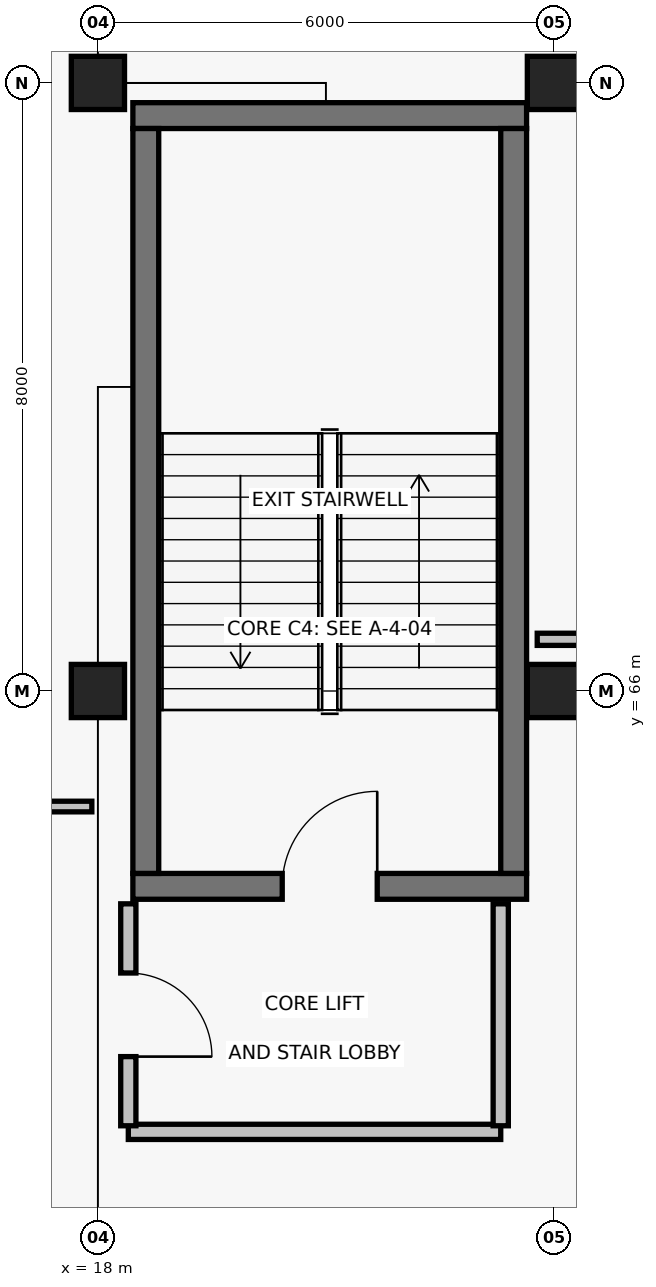
"""IFC4 building model, lengths in metres.
Left out: names, types, materials, properties, quantities, classifications, styles, units other than length and angle.
Written with IfcOpenShell. Run it as: python <this file> out.ifc"""

import sys

from ifc_helpers import new_model, si_unit, direction, frame, frame_2d, origin, origin_2d, place, context, subcontext, project, spatial, rectangle, extrude, element, fill, save


model = new_model("IFC4")
c1 = context("Model", 3, precision=1e-05, world=origin(), true_north=direction((0.0, 1.0)))
c2 = subcontext(c1, "Body", "Model", "MODEL_VIEW")
j1 = project(units=[si_unit("LENGTHUNIT", "METRE"), si_unit("PLANEANGLEUNIT", "RADIAN")], contexts=[c1])
p1 = place(None, origin())
s1 = spatial("IfcSite", under=j1, at=p1, CompositionType="ELEMENT")
p2 = place(p1, origin())
s2 = spatial("IfcBuilding", under=s1, at=p2, CompositionType="ELEMENT")
p3 = place(p2, frame((0.0, 0.0, 6.6)))
s3 = spatial("IfcBuildingStorey", under=s2, at=p3, CompositionType="ELEMENT", Elevation=6.6)
for number, where, z_axis, x_axis in (
    (1, (18.0, 66.0, 0.0), (0.0, 0.0, 1.0), (1.0, 0.0, 0.0)),
    (2, (18.0, 74.0, 0.0), (0.0, 0.0, 1.0), (1.0, 0.0, 0.0)),
    (3, (24.0, 66.0, 0.0), (0.0, 0.0, 1.0), (1.0, 0.0, 0.0)),
    (4, (24.0, 74.0, 0.0), (0.0, 0.0, 1.0), (1.0, 0.0, 0.0)),
):
    element("IfcColumn", number, at=place(p3, frame(where, z_axis=z_axis, x_axis=x_axis)), inside=s3, PredefinedType="COLUMN", context=c2, shape_type="SweptSolid", body=[
        extrude(rectangle(XDim=0.7, YDim=0.7, at=origin_2d()), origin(), (0.0, 0.0, 1.0), 4.8),
    ])
p4 = place(p3, frame((18.46, 63.43, 0.0), z_axis=(0.0, 0.0, 1.0), x_axis=(1.0, 0.0, 0.0)))
e5 = element("IfcWall", 5, at=p4, inside=s3, PredefinedType="SHEAR", context=c2, shape_type="SweptSolid", body=[
    extrude(rectangle(XDim=5.18, YDim=0.34, at=frame_2d((2.59, 0.0))), origin(), (0.0, 0.0, 1.0), 4.54),
])
p5 = place(p4, frame((1.965, 0.0, 0.0)))
e6 = element("IfcOpeningElement", 6, at=p5, cuts=e5, PredefinedType="OPENING", context=c2, shape_type="SweptSolid", body=[
    extrude(rectangle(XDim=1.25, YDim=2.2, at=frame_2d((0.625, 1.1))), frame((0.0, 0.185, 0.0), z_axis=(0.0, -1.0, 0.0), x_axis=(1.0, 0.0, 0.0)), (0.0, 0.0, 1.0), 0.37),
])
p6 = place(p3, frame((23.64, 73.57, 0.0), z_axis=(0.0, 0.0, 1.0), x_axis=(-1.0, 0.0, 0.0)))
e7 = element("IfcWall", 7, at=p6, inside=s3, PredefinedType="SHEAR", context=c2, shape_type="SweptSolid", body=[
    extrude(rectangle(XDim=5.18, YDim=0.34, at=frame_2d((2.59, 0.0))), origin(), (0.0, 0.0, 1.0), 4.54),
])
for number, where, z_axis, x_axis in (
    (8, (18.63, 73.4, 0.0), (0.0, 0.0, 1.0), (0.0, -1.0, 0.0)),
    (9, (23.47, 63.6, 0.0), (0.0, 0.0, 1.0), (0.0, 1.0, 0.0)),
):
    element("IfcWall", number, at=place(p3, frame(where, z_axis=z_axis, x_axis=x_axis)), inside=s3, PredefinedType="SHEAR", context=c2, shape_type="SweptSolid", body=[
        extrude(rectangle(XDim=9.8, YDim=0.34, at=frame_2d((4.9, 0.0))), origin(), (0.0, 0.0, 1.0), 4.54),
    ])
p7 = place(p3, frame((18.4, 60.2, 0.0), z_axis=(0.0, 0.0, 1.0), x_axis=(1.0, 0.0, 0.0)))
e10 = element("IfcWall", 10, at=p7, inside=s3, PredefinedType="PARTITIONING", context=c2, shape_type="SweptSolid", body=[
    extrude(rectangle(XDim=4.9, YDim=0.2, at=frame_2d((2.45, 0.0))), origin(), (0.0, 0.0, 1.0), 3.757),
])
p8 = place(p3, frame((18.4, 63.2, 0.0), z_axis=(0.0, 0.0, 1.0), x_axis=(0.0, -1.0, 0.0)))
e11 = element("IfcWall", 11, at=p8, inside=s3, PredefinedType="PARTITIONING", context=c2, shape_type="SweptSolid", body=[
    extrude(rectangle(XDim=2.92, YDim=0.2, at=frame_2d((1.46, 0.0))), origin(), (0.0, 0.0, 1.0), 3.757),
])
p9 = place(p8, frame((0.91, 0.0, 0.0)))
e12 = element("IfcOpeningElement", 12, at=p9, cuts=e11, PredefinedType="OPENING", context=c2, shape_type="SweptSolid", body=[
    extrude(rectangle(XDim=1.1, YDim=2.15, at=frame_2d((0.55, 1.075))), frame((0.0, 0.115, 0.0), z_axis=(0.0, -1.0, 0.0), x_axis=(1.0, 0.0, 0.0)), (0.0, 0.0, 1.0), 0.23),
])
p10 = place(p3, frame((23.3, 60.28, 0.0), z_axis=(0.0, 0.0, 1.0), x_axis=(0.0, 1.0, 0.0)))
e13 = element("IfcWall", 13, at=p10, inside=s3, PredefinedType="PARTITIONING", context=c2, shape_type="SweptSolid", body=[
    extrude(rectangle(XDim=2.92, YDim=0.2, at=frame_2d((1.46, 0.0))), origin(), (0.0, 0.0, 1.0), 4.48),
])
p11 = place(p3, frame((35.32, 66.68, 0.0), z_axis=(0.0, 0.0, 1.0), x_axis=(-1.0, 0.0, 0.0)))
e14 = element("IfcWall", 14, at=p11, inside=s3, PredefinedType="PARTITIONING", context=c2, shape_type="SweptSolid", body=[
    extrude(rectangle(XDim=11.54, YDim=0.16, at=frame_2d((5.77, 0.0))), origin(), (0.0, 0.0, 1.0), 3.757),
])
p12 = place(p11, frame((6.76, 0.0, 0.0)))
e15 = element("IfcOpeningElement", 15, at=p12, cuts=e14, PredefinedType="OPENING", context=c2, shape_type="SweptSolid", body=[
    extrude(rectangle(XDim=1.14, YDim=2.15, at=frame_2d((0.57, 1.075))), frame((0.0, 0.095, 0.0), z_axis=(0.0, -1.0, 0.0), x_axis=(1.0, 0.0, 0.0)), (0.0, 0.0, 1.0), 0.19),
])
p13 = place(p3, frame((17.92, 64.48, 0.0), z_axis=(0.0, 0.0, 1.0), x_axis=(-1.0, 0.0, 0.0)))
e16 = element("IfcWall", 16, at=p13, inside=s3, PredefinedType="PARTITIONING", context=c2, shape_type="SweptSolid", body=[
    extrude(rectangle(XDim=5.74, YDim=0.14, at=frame_2d((2.87, 0.0))), origin(), (0.0, 0.0, 1.0), 3.757),
])
p14 = place(p13, frame((2.27, 0.0, 0.0)))
e17 = element("IfcOpeningElement", 17, at=p14, cuts=e16, PredefinedType="OPENING", context=c2, shape_type="SweptSolid", body=[
    extrude(rectangle(XDim=1.2, YDim=2.15, at=frame_2d((0.6, 1.075))), frame((0.0, 0.085, 0.0), z_axis=(0.0, -1.0, 0.0), x_axis=(1.0, 0.0, 0.0)), (0.0, 0.0, 1.0), 0.17),
])
p15 = place(p5, origin())
e18 = element("IfcDoor", 18, at=p15, inside=s3, OperationType="SINGLE_SWING_RIGHT", PredefinedType="DOOR", context=c2, shape_type="SweptSolid", body=[
    extrude(rectangle(XDim=1.25, YDim=2.2, at=frame_2d((0.625, 1.1))), frame((0.0, 0.025, 0.0), z_axis=(0.0, -1.0, 0.0), x_axis=(1.0, 0.0, 0.0)), (0.0, 0.0, 1.0), 0.05),
])
fill(e6, e18)
p16 = place(p9, origin())
e19 = element("IfcDoor", 19, at=p16, inside=s3, OperationType="SINGLE_SWING_RIGHT", PredefinedType="DOOR", context=c2, shape_type="SweptSolid", body=[
    extrude(rectangle(XDim=1.1, YDim=2.15, at=frame_2d((0.55, 1.075))), frame((0.0, 0.025, 0.0), z_axis=(0.0, -1.0, 0.0), x_axis=(1.0, 0.0, 0.0)), (0.0, 0.0, 1.0), 0.05),
])
fill(e12, e19)
save(model, sys.argv[1])
